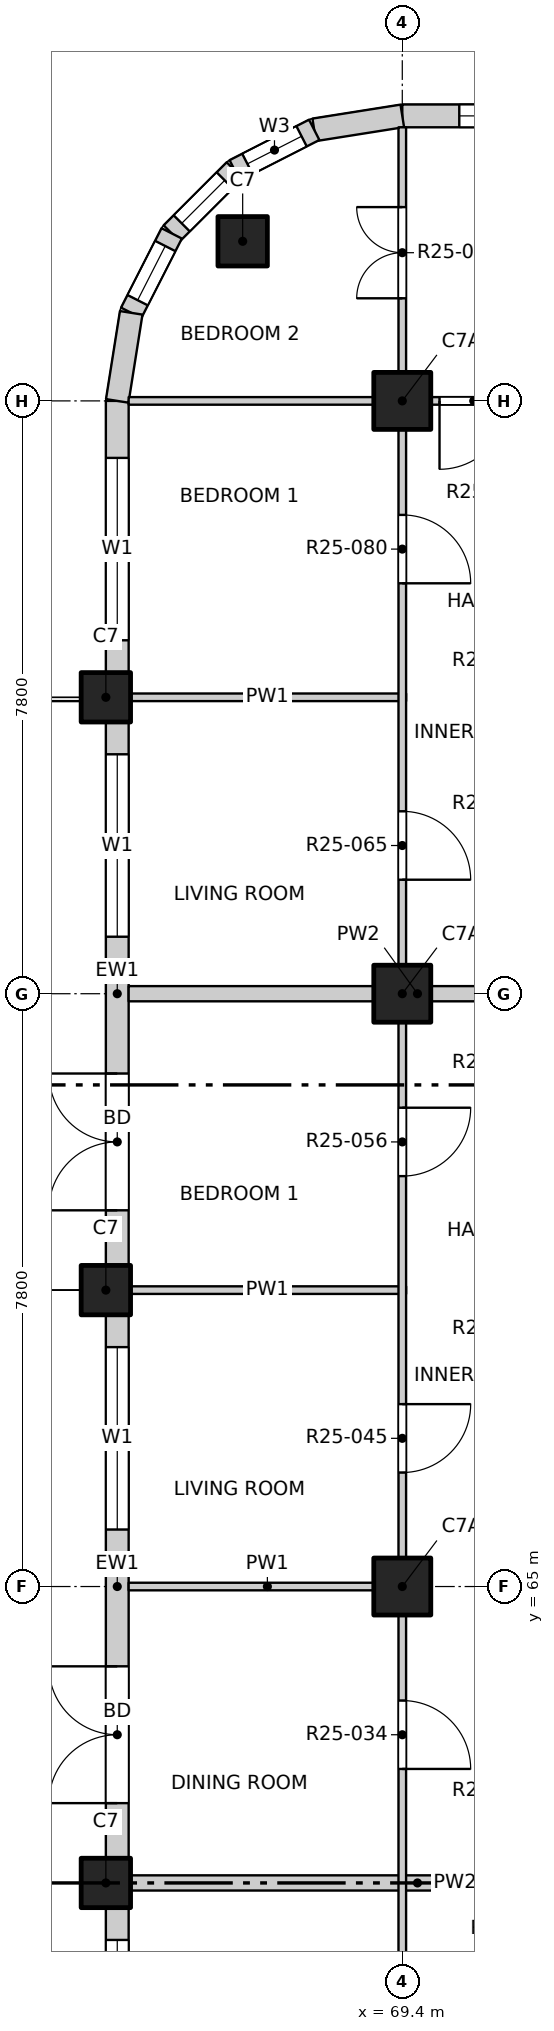
"""IFC4 building model, lengths in metres.
Left out: names, types, materials, properties, quantities, classifications, styles, units other than length and angle.
Written with IfcOpenShell. Run it as: python <this file> out.ifc"""

import sys

from ifc_helpers import new_model, si_unit, direction, frame, frame_2d, origin, origin_2d, place, context, subcontext, project, spatial, rectangle, extrude, element, fill, save


model = new_model("IFC4")
c1 = context("Model", 3, precision=1e-05, world=origin(), true_north=direction((0.0, 1.0)))
c2 = subcontext(c1, "Body", "Model", "MODEL_VIEW")
j1 = project(units=[si_unit("LENGTHUNIT", "METRE"), si_unit("PLANEANGLEUNIT", "RADIAN")], contexts=[c1])
p1 = place(None, origin())
s1 = spatial("IfcSite", under=j1, at=p1, CompositionType="ELEMENT")
p2 = place(p1, origin())
s2 = spatial("IfcBuilding", under=s1, at=p2, CompositionType="ELEMENT")
p3 = place(p2, frame((0.0, 0.0, 252.8)))
s3 = spatial("IfcBuildingStorey", under=s2, at=p3, CompositionType="ELEMENT", Elevation=252.8)
for number, where, z_axis, x_axis in (
    (1, (67.3, 82.7, -0.25), (0.0, 0.0, 1.0), (1.0, 0.0, 0.0)),
    (2, (65.5, 61.1, -0.25), (0.0, 0.0, 1.0), (1.0, 0.0, 0.0)),
    (3, (65.5, 68.9, -0.25), (0.0, 0.0, 1.0), (1.0, 0.0, 0.0)),
    (4, (65.5, 76.7, -0.25), (0.0, 0.0, 1.0), (1.0, 0.0, 0.0)),
):
    element("IfcColumn", number, at=place(p3, frame(where, z_axis=z_axis, x_axis=x_axis)), inside=s3, PredefinedType="COLUMN", context=c2, shape_type="SweptSolid", body=[
        extrude(rectangle(XDim=0.65, YDim=0.65, at=origin_2d()), origin(), (0.0, 0.0, 1.0), 3.4),
    ])
for number, where, z_axis, x_axis in (
    (5, (69.4, 65.0, -0.25), (0.0, 0.0, 1.0), (1.0, 0.0, 0.0)),
    (6, (69.4, 72.8, -0.25), (0.0, 0.0, 1.0), (1.0, 0.0, 0.0)),
    (7, (69.4, 80.6, -0.25), (0.0, 0.0, 1.0), (1.0, 0.0, 0.0)),
):
    element("IfcColumn", number, at=place(p3, frame(where, z_axis=z_axis, x_axis=x_axis)), inside=s3, PredefinedType="COLUMN", context=c2, shape_type="SweptSolid", body=[
        extrude(rectangle(XDim=0.75, YDim=0.75, at=origin_2d()), origin(), (0.0, 0.0, 1.0), 3.4),
    ])
p4 = place(p3, frame((69.4, 84.35, 0.0), z_axis=(0.0, 0.0, 1.0), x_axis=(1.0, 0.0, 0.0)))
e8 = element("IfcWall", 8, at=p4, inside=s3, PredefinedType="SOLIDWALL", context=c2, shape_type="SweptSolid", body=[
    extrude(rectangle(XDim=3.575, YDim=0.3, at=frame_2d((1.788, 0.0))), origin(), (0.0, 0.0, 1.0), 2.7),
])
p5 = place(p4, frame((0.75, 0.0, 0.9)))
e9 = element("IfcOpeningElement", 9, at=p5, cuts=e8, PredefinedType="OPENING", context=c2, shape_type="SweptSolid", body=[
    extrude(rectangle(XDim=2.4, YDim=1.8, at=frame_2d((1.2, 0.9))), frame((0.0, 0.16, 0.0), z_axis=(0.0, -1.0, 0.0), x_axis=(1.0, 0.0, 0.0)), (0.0, 0.0, 1.0), 0.32),
])
p6 = place(p3, frame((65.65, 53.625, 0.0), z_axis=(0.0, 0.0, 1.0), x_axis=(0.0, 1.0, 0.0)))
e10 = element("IfcWall", 10, at=p6, inside=s3, PredefinedType="SOLIDWALL", context=c2, shape_type="SweptSolid", body=[
    extrude(rectangle(XDim=7.15, YDim=0.3, at=frame_2d((3.575, 0.0))), origin(), (0.0, 0.0, 1.0), 2.7),
])
p7 = place(p6, frame((0.725, 0.0, 0.0)))
e11 = element("IfcOpeningElement", 11, at=p7, cuts=e10, PredefinedType="OPENING", context=c2, shape_type="SweptSolid", body=[
    extrude(rectangle(XDim=1.8, YDim=2.4, at=frame_2d((0.9, 1.2))), frame((0.0, 0.16, 0.0), z_axis=(0.0, -1.0, 0.0), x_axis=(1.0, 0.0, 0.0)), (0.0, 0.0, 1.0), 0.32),
])
p8 = place(p6, frame((4.325, 0.0, 0.9)))
e12 = element("IfcOpeningElement", 12, at=p8, cuts=e10, PredefinedType="OPENING", context=c2, shape_type="SweptSolid", body=[
    extrude(rectangle(XDim=2.4, YDim=1.8, at=frame_2d((1.2, 0.9))), frame((0.0, 0.16, 0.0), z_axis=(0.0, -1.0, 0.0), x_axis=(1.0, 0.0, 0.0)), (0.0, 0.0, 1.0), 0.32),
])
p9 = place(p3, frame((65.65, 61.425, 0.0), z_axis=(0.0, 0.0, 1.0), x_axis=(0.0, 1.0, 0.0)))
e13 = element("IfcWall", 13, at=p9, inside=s3, PredefinedType="SOLIDWALL", context=c2, shape_type="SweptSolid", body=[
    extrude(rectangle(XDim=7.15, YDim=0.3, at=frame_2d((3.575, 0.0))), origin(), (0.0, 0.0, 1.0), 2.7),
])
p10 = place(p9, frame((0.725, 0.0, 0.0)))
e14 = element("IfcOpeningElement", 14, at=p10, cuts=e13, PredefinedType="OPENING", context=c2, shape_type="SweptSolid", body=[
    extrude(rectangle(XDim=1.8, YDim=2.4, at=frame_2d((0.9, 1.2))), frame((0.0, 0.16, 0.0), z_axis=(0.0, -1.0, 0.0), x_axis=(1.0, 0.0, 0.0)), (0.0, 0.0, 1.0), 0.32),
])
p11 = place(p9, frame((4.325, 0.0, 0.9)))
e15 = element("IfcOpeningElement", 15, at=p11, cuts=e13, PredefinedType="OPENING", context=c2, shape_type="SweptSolid", body=[
    extrude(rectangle(XDim=2.4, YDim=1.8, at=frame_2d((1.2, 0.9))), frame((0.0, 0.16, 0.0), z_axis=(0.0, -1.0, 0.0), x_axis=(1.0, 0.0, 0.0)), (0.0, 0.0, 1.0), 0.32),
])
p12 = place(p3, frame((65.65, 69.225, 0.0), z_axis=(0.0, 0.0, 1.0), x_axis=(0.0, 1.0, 0.0)))
e16 = element("IfcWall", 16, at=p12, inside=s3, PredefinedType="SOLIDWALL", context=c2, shape_type="SweptSolid", body=[
    extrude(rectangle(XDim=7.15, YDim=0.3, at=frame_2d((3.575, 0.0))), origin(), (0.0, 0.0, 1.0), 2.7),
])
p13 = place(p12, frame((0.725, 0.0, 0.0)))
e17 = element("IfcOpeningElement", 17, at=p13, cuts=e16, PredefinedType="OPENING", context=c2, shape_type="SweptSolid", body=[
    extrude(rectangle(XDim=1.8, YDim=2.4, at=frame_2d((0.9, 1.2))), frame((0.0, 0.16, 0.0), z_axis=(0.0, -1.0, 0.0), x_axis=(1.0, 0.0, 0.0)), (0.0, 0.0, 1.0), 0.32),
])
p14 = place(p12, frame((4.325, 0.0, 0.9)))
e18 = element("IfcOpeningElement", 18, at=p14, cuts=e16, PredefinedType="OPENING", context=c2, shape_type="SweptSolid", body=[
    extrude(rectangle(XDim=2.4, YDim=1.8, at=frame_2d((1.2, 0.9))), frame((0.0, 0.16, 0.0), z_axis=(0.0, -1.0, 0.0), x_axis=(1.0, 0.0, 0.0)), (0.0, 0.0, 1.0), 0.32),
])
p15 = place(p3, frame((65.65, 77.025, 0.0), z_axis=(0.0, 0.0, 1.0), x_axis=(0.0, 1.0, 0.0)))
e19 = element("IfcWall", 19, at=p15, inside=s3, PredefinedType="SOLIDWALL", context=c2, shape_type="SweptSolid", body=[
    extrude(rectangle(XDim=3.575, YDim=0.3, at=frame_2d((1.788, 0.0))), origin(), (0.0, 0.0, 1.0), 2.7),
])
p16 = place(p15, frame((0.425, 0.0, 0.9)))
e20 = element("IfcOpeningElement", 20, at=p16, cuts=e19, PredefinedType="OPENING", context=c2, shape_type="SweptSolid", body=[
    extrude(rectangle(XDim=2.4, YDim=1.8, at=frame_2d((1.2, 0.9))), frame((0.0, 0.16, 0.0), z_axis=(0.0, -1.0, 0.0), x_axis=(1.0, 0.0, 0.0)), (0.0, 0.0, 1.0), 0.32),
])
p17 = place(p3, frame((69.4, 84.35, 0.0), z_axis=(0.0, 0.0, 1.0), x_axis=(-0.987678452879, -0.156496880861, 0.0)))
e21 = element("IfcWall", 21, at=p17, inside=s3, PredefinedType="SOLIDWALL", context=c2, shape_type="SweptSolid", body=[
    extrude(rectangle(XDim=1.173, YDim=0.3, at=frame_2d((0.586, 0.0))), origin(), (0.0, 0.0, 1.0), 2.7),
])
p18 = place(p3, frame((68.241, 84.167, 0.0), z_axis=(0.0, 0.0, 1.0), x_axis=(-0.890988677504, -0.454025524128, 0.0)))
e22 = element("IfcWall", 22, at=p18, inside=s3, PredefinedType="SOLIDWALL", context=c2, shape_type="SweptSolid", body=[
    extrude(rectangle(XDim=1.173, YDim=0.3, at=frame_2d((0.587, 0.0))), origin(), (0.0, 0.0, 1.0), 2.7),
])
p19 = place(p18, frame((0.187, 0.0, 0.9)))
e23 = element("IfcOpeningElement", 23, at=p19, cuts=e22, PredefinedType="OPENING", context=c2, shape_type="SweptSolid", body=[
    extrude(rectangle(XDim=0.8, YDim=1.2, at=frame_2d((0.4, 0.6))), frame((0.0, 0.16, 0.0), z_axis=(0.0, -1.0, 0.0), x_axis=(1.0, 0.0, 0.0)), (0.0, 0.0, 1.0), 0.32),
])
p20 = place(p3, frame((67.196, 83.634, 0.0), z_axis=(0.0, 0.0, 1.0), x_axis=(-0.707106781187, -0.707106781187, 0.0)))
e24 = element("IfcWall", 24, at=p20, inside=s3, PredefinedType="SOLIDWALL", context=c2, shape_type="SweptSolid", body=[
    extrude(rectangle(XDim=1.173, YDim=0.3, at=frame_2d((0.586, 0.0))), origin(), (0.0, 0.0, 1.0), 2.7),
])
p21 = place(p20, frame((0.187, 0.0, 0.9)))
e25 = element("IfcOpeningElement", 25, at=p21, cuts=e24, PredefinedType="OPENING", context=c2, shape_type="SweptSolid", body=[
    extrude(rectangle(XDim=0.8, YDim=1.2, at=frame_2d((0.4, 0.6))), frame((0.0, 0.16, 0.0), z_axis=(0.0, -1.0, 0.0), x_axis=(1.0, 0.0, 0.0)), (0.0, 0.0, 1.0), 0.32),
])
p22 = place(p3, frame((66.366, 82.804, 0.0), z_axis=(0.0, 0.0, 1.0), x_axis=(-0.454025524128, -0.890988677504, 0.0)))
e26 = element("IfcWall", 26, at=p22, inside=s3, PredefinedType="SOLIDWALL", context=c2, shape_type="SweptSolid", body=[
    extrude(rectangle(XDim=1.173, YDim=0.3, at=frame_2d((0.587, 0.0))), origin(), (0.0, 0.0, 1.0), 2.7),
])
p23 = place(p22, frame((0.187, 0.0, 0.9)))
e27 = element("IfcOpeningElement", 27, at=p23, cuts=e26, PredefinedType="OPENING", context=c2, shape_type="SweptSolid", body=[
    extrude(rectangle(XDim=0.8, YDim=1.2, at=frame_2d((0.4, 0.6))), frame((0.0, 0.16, 0.0), z_axis=(0.0, -1.0, 0.0), x_axis=(1.0, 0.0, 0.0)), (0.0, 0.0, 1.0), 0.32),
])
p24 = place(p3, frame((65.833, 81.759, 0.0), z_axis=(0.0, 0.0, 1.0), x_axis=(-0.156496880861, -0.987678452879, 0.0)))
e28 = element("IfcWall", 28, at=p24, inside=s3, PredefinedType="SOLIDWALL", context=c2, shape_type="SweptSolid", body=[
    extrude(rectangle(XDim=1.173, YDim=0.3, at=frame_2d((0.586, 0.0))), origin(), (0.0, 0.0, 1.0), 2.7),
])
p25 = place(p3, frame((65.8, 61.1, 0.0), z_axis=(0.0, 0.0, 1.0), x_axis=(1.0, 0.0, 0.0)))
e29 = element("IfcWall", 29, at=p25, inside=s3, PredefinedType="PARTITIONING", context=c2, shape_type="SweptSolid", body=[
    extrude(rectangle(XDim=7.6, YDim=0.2, at=frame_2d((3.8, 0.0))), origin(), (0.0, 0.0, 1.0), 2.55),
])
p26 = place(p3, frame((65.8, 65.0, 0.0), z_axis=(0.0, 0.0, 1.0), x_axis=(1.0, 0.0, 0.0)))
e30 = element("IfcWall", 30, at=p26, inside=s3, PredefinedType="PARTITIONING", context=c2, shape_type="SweptSolid", body=[
    extrude(rectangle(XDim=3.65, YDim=0.1, at=frame_2d((1.825, 0.0))), origin(), (0.0, 0.0, 1.0), 3.15),
])
p27 = place(p3, frame((65.8, 68.9, 0.0), z_axis=(0.0, 0.0, 1.0), x_axis=(1.0, 0.0, 0.0)))
e31 = element("IfcWall", 31, at=p27, inside=s3, PredefinedType="PARTITIONING", context=c2, shape_type="SweptSolid", body=[
    extrude(rectangle(XDim=3.65, YDim=0.1, at=frame_2d((1.825, 0.0))), origin(), (0.0, 0.0, 1.0), 2.55),
])
p28 = place(p3, frame((65.8, 72.8, 0.0), z_axis=(0.0, 0.0, 1.0), x_axis=(1.0, 0.0, 0.0)))
e32 = element("IfcWall", 32, at=p28, inside=s3, PredefinedType="PARTITIONING", context=c2, shape_type="SweptSolid", body=[
    extrude(rectangle(XDim=7.6, YDim=0.2, at=frame_2d((3.8, 0.0))), origin(), (0.0, 0.0, 1.0), 3.15),
])
p29 = place(p3, frame((65.8, 76.7, 0.0), z_axis=(0.0, 0.0, 1.0), x_axis=(1.0, 0.0, 0.0)))
e33 = element("IfcWall", 33, at=p29, inside=s3, PredefinedType="PARTITIONING", context=c2, shape_type="SweptSolid", body=[
    extrude(rectangle(XDim=3.65, YDim=0.1, at=frame_2d((1.825, 0.0))), origin(), (0.0, 0.0, 1.0), 2.55),
])
p30 = place(p3, frame((65.8, 80.6, 0.0), z_axis=(0.0, 0.0, 1.0), x_axis=(1.0, 0.0, 0.0)))
e34 = element("IfcWall", 34, at=p30, inside=s3, PredefinedType="PARTITIONING", context=c2, shape_type="SweptSolid", body=[
    extrude(rectangle(XDim=7.6, YDim=0.1, at=frame_2d((3.8, 0.0))), origin(), (0.0, 0.0, 1.0), 3.15),
])
p31 = place(p30, frame((4.09, 0.0, 0.0)))
e35 = element("IfcOpeningElement", 35, at=p31, cuts=e34, PredefinedType="OPENING", context=c2, shape_type="SweptSolid", body=[
    extrude(rectangle(XDim=0.9, YDim=2.1, at=frame_2d((0.45, 1.05))), frame((0.0, 0.06, 0.0), z_axis=(0.0, -1.0, 0.0), x_axis=(1.0, 0.0, 0.0)), (0.0, 0.0, 1.0), 0.12),
])
p32 = place(p3, frame((69.4, 45.8, 0.0), z_axis=(0.0, 0.0, 1.0), x_axis=(0.0, 1.0, 0.0)))
e36 = element("IfcWall", 36, at=p32, inside=s3, PredefinedType="PARTITIONING", context=c2, shape_type="SweptSolid", body=[
    extrude(rectangle(XDim=38.4, YDim=0.1, at=frame_2d((19.2, 0.0))), origin(), (0.0, 0.0, 1.0), 3.15),
])
p33 = place(p32, frame((1.05, 0.0, 0.0)))
e37 = element("IfcOpeningElement", 37, at=p33, cuts=e36, PredefinedType="OPENING", context=c2, shape_type="SweptSolid", body=[
    extrude(rectangle(XDim=1.2, YDim=2.1, at=frame_2d((0.6, 1.05))), frame((0.0, 0.06, 0.0), z_axis=(0.0, -1.0, 0.0), x_axis=(1.0, 0.0, 0.0)), (0.0, 0.0, 1.0), 0.12),
])
p34 = place(p32, frame((5.1, 0.0, 0.0)))
e38 = element("IfcOpeningElement", 38, at=p34, cuts=e36, PredefinedType="OPENING", context=c2, shape_type="SweptSolid", body=[
    extrude(rectangle(XDim=0.9, YDim=2.1, at=frame_2d((0.45, 1.05))), frame((0.0, 0.06, 0.0), z_axis=(0.0, -1.0, 0.0), x_axis=(1.0, 0.0, 0.0)), (0.0, 0.0, 1.0), 0.12),
])
p35 = place(p32, frame((9.0, 0.0, 0.0)))
e39 = element("IfcOpeningElement", 39, at=p35, cuts=e36, PredefinedType="OPENING", context=c2, shape_type="SweptSolid", body=[
    extrude(rectangle(XDim=0.9, YDim=2.1, at=frame_2d((0.45, 1.05))), frame((0.0, 0.06, 0.0), z_axis=(0.0, -1.0, 0.0), x_axis=(1.0, 0.0, 0.0)), (0.0, 0.0, 1.0), 0.12),
])
p36 = place(p32, frame((12.9, 0.0, 0.0)))
e40 = element("IfcOpeningElement", 40, at=p36, cuts=e36, PredefinedType="OPENING", context=c2, shape_type="SweptSolid", body=[
    extrude(rectangle(XDim=0.9, YDim=2.1, at=frame_2d((0.45, 1.05))), frame((0.0, 0.06, 0.0), z_axis=(0.0, -1.0, 0.0), x_axis=(1.0, 0.0, 0.0)), (0.0, 0.0, 1.0), 0.12),
])
p37 = place(p32, frame((16.8, 0.0, 0.0)))
e41 = element("IfcOpeningElement", 41, at=p37, cuts=e36, PredefinedType="OPENING", context=c2, shape_type="SweptSolid", body=[
    extrude(rectangle(XDim=0.9, YDim=2.1, at=frame_2d((0.45, 1.05))), frame((0.0, 0.06, 0.0), z_axis=(0.0, -1.0, 0.0), x_axis=(1.0, 0.0, 0.0)), (0.0, 0.0, 1.0), 0.12),
])
p38 = place(p32, frame((20.7, 0.0, 0.0)))
e42 = element("IfcOpeningElement", 42, at=p38, cuts=e36, PredefinedType="OPENING", context=c2, shape_type="SweptSolid", body=[
    extrude(rectangle(XDim=0.9, YDim=2.1, at=frame_2d((0.45, 1.05))), frame((0.0, 0.06, 0.0), z_axis=(0.0, -1.0, 0.0), x_axis=(1.0, 0.0, 0.0)), (0.0, 0.0, 1.0), 0.12),
])
p39 = place(p32, frame((24.6, 0.0, 0.0)))
e43 = element("IfcOpeningElement", 43, at=p39, cuts=e36, PredefinedType="OPENING", context=c2, shape_type="SweptSolid", body=[
    extrude(rectangle(XDim=0.9, YDim=2.1, at=frame_2d((0.45, 1.05))), frame((0.0, 0.06, 0.0), z_axis=(0.0, -1.0, 0.0), x_axis=(1.0, 0.0, 0.0)), (0.0, 0.0, 1.0), 0.12),
])
p40 = place(p32, frame((28.5, 0.0, 0.0)))
e44 = element("IfcOpeningElement", 44, at=p40, cuts=e36, PredefinedType="OPENING", context=c2, shape_type="SweptSolid", body=[
    extrude(rectangle(XDim=0.9, YDim=2.1, at=frame_2d((0.45, 1.05))), frame((0.0, 0.06, 0.0), z_axis=(0.0, -1.0, 0.0), x_axis=(1.0, 0.0, 0.0)), (0.0, 0.0, 1.0), 0.12),
])
p41 = place(p32, frame((32.4, 0.0, 0.0)))
e45 = element("IfcOpeningElement", 45, at=p41, cuts=e36, PredefinedType="OPENING", context=c2, shape_type="SweptSolid", body=[
    extrude(rectangle(XDim=0.9, YDim=2.1, at=frame_2d((0.45, 1.05))), frame((0.0, 0.06, 0.0), z_axis=(0.0, -1.0, 0.0), x_axis=(1.0, 0.0, 0.0)), (0.0, 0.0, 1.0), 0.12),
])
p42 = place(p32, frame((36.15, 0.0, 0.0)))
e46 = element("IfcOpeningElement", 46, at=p42, cuts=e36, PredefinedType="OPENING", context=c2, shape_type="SweptSolid", body=[
    extrude(rectangle(XDim=1.2, YDim=2.1, at=frame_2d((0.6, 1.05))), frame((0.0, 0.06, 0.0), z_axis=(0.0, -1.0, 0.0), x_axis=(1.0, 0.0, 0.0)), (0.0, 0.0, 1.0), 0.12),
])
p43 = place(p5, origin())
e47 = element("IfcWindow", 47, at=p43, inside=s3, PartitioningType="DOUBLE_PANEL_VERTICAL", PredefinedType="WINDOW", context=c2, shape_type="SweptSolid", body=[
    extrude(rectangle(XDim=2.4, YDim=1.8, at=frame_2d((1.2, 0.9))), frame((0.0, 0.03, 0.0), z_axis=(0.0, -1.0, 0.0), x_axis=(1.0, 0.0, 0.0)), (0.0, 0.0, 1.0), 0.06),
])
fill(e9, e47)
p44 = place(p8, origin())
e48 = element("IfcWindow", 48, at=p44, inside=s3, PartitioningType="DOUBLE_PANEL_VERTICAL", PredefinedType="WINDOW", context=c2, shape_type="SweptSolid", body=[
    extrude(rectangle(XDim=2.4, YDim=1.8, at=frame_2d((1.2, 0.9))), frame((0.0, 0.03, 0.0), z_axis=(0.0, -1.0, 0.0), x_axis=(1.0, 0.0, 0.0)), (0.0, 0.0, 1.0), 0.06),
])
fill(e12, e48)
p45 = place(p10, origin())
e49 = element("IfcDoor", 49, at=p45, inside=s3, OperationType="DOUBLE_DOOR_SINGLE_SWING", PredefinedType="DOOR", context=c2, shape_type="SweptSolid", body=[
    extrude(rectangle(XDim=1.8, YDim=2.4, at=frame_2d((0.9, 1.2))), frame((0.0, 0.025, 0.0), z_axis=(0.0, -1.0, 0.0), x_axis=(1.0, 0.0, 0.0)), (0.0, 0.0, 1.0), 0.05),
])
fill(e14, e49)
p46 = place(p11, origin())
e50 = element("IfcWindow", 50, at=p46, inside=s3, PartitioningType="DOUBLE_PANEL_VERTICAL", PredefinedType="WINDOW", context=c2, shape_type="SweptSolid", body=[
    extrude(rectangle(XDim=2.4, YDim=1.8, at=frame_2d((1.2, 0.9))), frame((0.0, 0.03, 0.0), z_axis=(0.0, -1.0, 0.0), x_axis=(1.0, 0.0, 0.0)), (0.0, 0.0, 1.0), 0.06),
])
fill(e15, e50)
p47 = place(p13, origin())
e51 = element("IfcDoor", 51, at=p47, inside=s3, OperationType="DOUBLE_DOOR_SINGLE_SWING", PredefinedType="DOOR", context=c2, shape_type="SweptSolid", body=[
    extrude(rectangle(XDim=1.8, YDim=2.4, at=frame_2d((0.9, 1.2))), frame((0.0, 0.025, 0.0), z_axis=(0.0, -1.0, 0.0), x_axis=(1.0, 0.0, 0.0)), (0.0, 0.0, 1.0), 0.05),
])
fill(e17, e51)
p48 = place(p14, origin())
e52 = element("IfcWindow", 52, at=p48, inside=s3, PartitioningType="DOUBLE_PANEL_VERTICAL", PredefinedType="WINDOW", context=c2, shape_type="SweptSolid", body=[
    extrude(rectangle(XDim=2.4, YDim=1.8, at=frame_2d((1.2, 0.9))), frame((0.0, 0.03, 0.0), z_axis=(0.0, -1.0, 0.0), x_axis=(1.0, 0.0, 0.0)), (0.0, 0.0, 1.0), 0.06),
])
fill(e18, e52)
p49 = place(p16, origin())
e53 = element("IfcWindow", 53, at=p49, inside=s3, PartitioningType="DOUBLE_PANEL_VERTICAL", PredefinedType="WINDOW", context=c2, shape_type="SweptSolid", body=[
    extrude(rectangle(XDim=2.4, YDim=1.8, at=frame_2d((1.2, 0.9))), frame((0.0, 0.03, 0.0), z_axis=(0.0, -1.0, 0.0), x_axis=(1.0, 0.0, 0.0)), (0.0, 0.0, 1.0), 0.06),
])
fill(e20, e53)
p50 = place(p19, origin())
e54 = element("IfcWindow", 54, at=p50, inside=s3, PartitioningType="SINGLE_PANEL", PredefinedType="WINDOW", context=c2, shape_type="SweptSolid", body=[
    extrude(rectangle(XDim=0.8, YDim=1.2, at=frame_2d((0.4, 0.6))), frame((0.0, 0.03, 0.0), z_axis=(0.0, -1.0, 0.0), x_axis=(1.0, 0.0, 0.0)), (0.0, 0.0, 1.0), 0.06),
])
fill(e23, e54)
p51 = place(p21, origin())
e55 = element("IfcWindow", 55, at=p51, inside=s3, PartitioningType="SINGLE_PANEL", PredefinedType="WINDOW", context=c2, shape_type="SweptSolid", body=[
    extrude(rectangle(XDim=0.8, YDim=1.2, at=frame_2d((0.4, 0.6))), frame((0.0, 0.03, 0.0), z_axis=(0.0, -1.0, 0.0), x_axis=(1.0, 0.0, 0.0)), (0.0, 0.0, 1.0), 0.06),
])
fill(e25, e55)
p52 = place(p23, origin())
e56 = element("IfcWindow", 56, at=p52, inside=s3, PartitioningType="SINGLE_PANEL", PredefinedType="WINDOW", context=c2, shape_type="SweptSolid", body=[
    extrude(rectangle(XDim=0.8, YDim=1.2, at=frame_2d((0.4, 0.6))), frame((0.0, 0.03, 0.0), z_axis=(0.0, -1.0, 0.0), x_axis=(1.0, 0.0, 0.0)), (0.0, 0.0, 1.0), 0.06),
])
fill(e27, e56)
p53 = place(p37, origin())
e57 = element("IfcDoor", 57, at=p53, inside=s3, OperationType="SINGLE_SWING_RIGHT", PredefinedType="DOOR", context=c2, shape_type="SweptSolid", body=[
    extrude(rectangle(XDim=0.9, YDim=2.1, at=frame_2d((0.45, 1.05))), frame((0.0, 0.025, 0.0), z_axis=(0.0, -1.0, 0.0), x_axis=(1.0, 0.0, 0.0)), (0.0, 0.0, 1.0), 0.05),
])
fill(e41, e57)
p54 = place(p38, origin())
e58 = element("IfcDoor", 58, at=p54, inside=s3, OperationType="SINGLE_SWING_LEFT", PredefinedType="DOOR", context=c2, shape_type="SweptSolid", body=[
    extrude(rectangle(XDim=0.9, YDim=2.1, at=frame_2d((0.45, 1.05))), frame((0.0, 0.025, 0.0), z_axis=(0.0, -1.0, 0.0), x_axis=(1.0, 0.0, 0.0)), (0.0, 0.0, 1.0), 0.05),
])
fill(e42, e58)
p55 = place(p39, origin())
e59 = element("IfcDoor", 59, at=p55, inside=s3, OperationType="SINGLE_SWING_LEFT", PredefinedType="DOOR", context=c2, shape_type="SweptSolid", body=[
    extrude(rectangle(XDim=0.9, YDim=2.1, at=frame_2d((0.45, 1.05))), frame((0.0, 0.025, 0.0), z_axis=(0.0, -1.0, 0.0), x_axis=(1.0, 0.0, 0.0)), (0.0, 0.0, 1.0), 0.05),
])
fill(e43, e59)
p56 = place(p40, origin())
e60 = element("IfcDoor", 60, at=p56, inside=s3, OperationType="SINGLE_SWING_RIGHT", PredefinedType="DOOR", context=c2, shape_type="SweptSolid", body=[
    extrude(rectangle(XDim=0.9, YDim=2.1, at=frame_2d((0.45, 1.05))), frame((0.0, 0.025, 0.0), z_axis=(0.0, -1.0, 0.0), x_axis=(1.0, 0.0, 0.0)), (0.0, 0.0, 1.0), 0.05),
])
fill(e44, e60)
p57 = place(p41, origin())
e61 = element("IfcDoor", 61, at=p57, inside=s3, OperationType="SINGLE_SWING_RIGHT", PredefinedType="DOOR", context=c2, shape_type="SweptSolid", body=[
    extrude(rectangle(XDim=0.9, YDim=2.1, at=frame_2d((0.45, 1.05))), frame((0.0, 0.025, 0.0), z_axis=(0.0, -1.0, 0.0), x_axis=(1.0, 0.0, 0.0)), (0.0, 0.0, 1.0), 0.05),
])
fill(e45, e61)
p58 = place(p31, origin())
e62 = element("IfcDoor", 62, at=p58, inside=s3, OperationType="SINGLE_SWING_RIGHT", PredefinedType="DOOR", context=c2, shape_type="SweptSolid", body=[
    extrude(rectangle(XDim=0.9, YDim=2.1, at=frame_2d((0.45, 1.05))), frame((0.0, 0.025, 0.0), z_axis=(0.0, -1.0, 0.0), x_axis=(1.0, 0.0, 0.0)), (0.0, 0.0, 1.0), 0.05),
])
fill(e35, e62)
p59 = place(p42, origin())
e63 = element("IfcDoor", 63, at=p59, inside=s3, OperationType="DOUBLE_DOOR_SINGLE_SWING", PredefinedType="DOOR", context=c2, shape_type="SweptSolid", body=[
    extrude(rectangle(XDim=1.2, YDim=2.1, at=frame_2d((0.6, 1.05))), frame((0.0, 0.025, 0.0), z_axis=(0.0, -1.0, 0.0), x_axis=(1.0, 0.0, 0.0)), (0.0, 0.0, 1.0), 0.05),
])
fill(e46, e63)
save(model, sys.argv[1])
